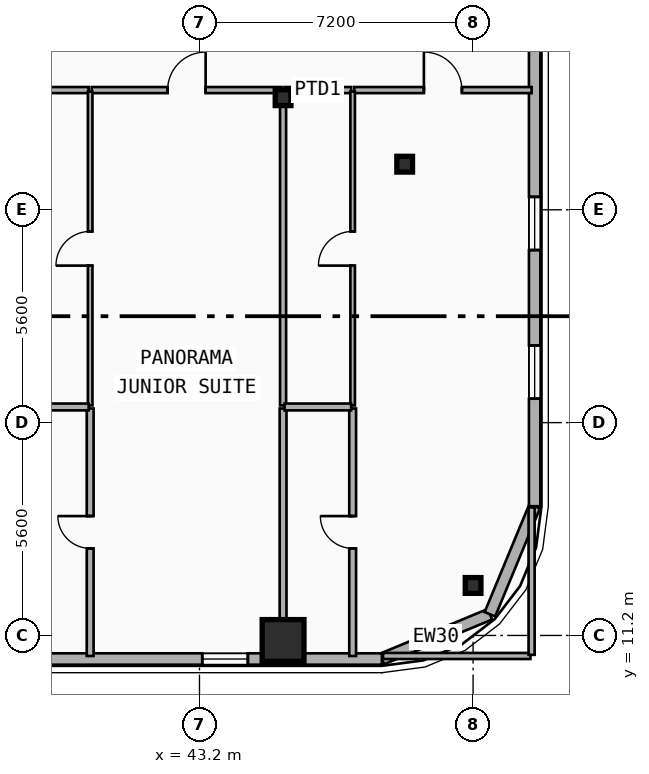
"""IFC4 building model, lengths in metres.
Left out: names, types, materials, properties, quantities, classifications, styles, units other than length and angle.
Written with IfcOpenShell. Run it as: python <this file> out.ifc"""

import sys

from ifc_helpers import new_model, si_unit, direction, frame, frame_2d, origin, origin_2d, place, context, subcontext, project, spatial, rectangle, i_section, extrude, element, fill, save


model = new_model("IFC4")
c1 = context("Model", 3, precision=1e-05, world=origin(), true_north=direction((0.0, 1.0)))
c2 = subcontext(c1, "Body", "Model", "MODEL_VIEW")
j1 = project(units=[si_unit("LENGTHUNIT", "METRE"), si_unit("PLANEANGLEUNIT", "RADIAN")], contexts=[c1])
p1 = place(None, origin())
s1 = spatial("IfcSite", under=j1, at=p1, CompositionType="ELEMENT")
p2 = place(p1, origin())
s2 = spatial("IfcBuilding", under=s1, at=p2, CompositionType="ELEMENT")
p3 = place(p2, frame((0.0, 0.0, 166.1)))
s3 = spatial("IfcBuildingStorey", under=s2, at=p3, CompositionType="ELEMENT", Elevation=166.1)
p4 = place(p3, frame((45.4, 25.35, 0.0), z_axis=(0.0, 0.0, 1.0), x_axis=(1.0, 0.0, 0.0)))
e1 = element("IfcColumn", 1, at=p4, inside=s3, PredefinedType="COLUMN", context=c2, shape_type="SweptSolid", body=[
    extrude(i_section(OverallWidth=0.413, OverallDepth=0.415, WebThickness=0.03, FlangeThickness=0.047, FilletRadius=0.015, at=origin_2d()), origin(), (0.0, 0.0, 1.0), 3.55),
])
p5 = place(p3, frame((45.4, 11.176, 0.0), z_axis=(0.0, -0.090276360409, 0.995916752922), x_axis=(1.0, 0.0, 0.0)))
e2 = element("IfcColumn", 2, at=p5, inside=s3, PredefinedType="COLUMN", context=c2, shape_type="SweptSolid", body=[
    extrude(rectangle(XDim=1.1, YDim=1.1, at=origin_2d()), origin(), (0.0, 0.0, 1.0), 3.564),
])
p6 = place(p3, frame((48.6, 23.6, 0.0), z_axis=(0.0, 0.0, 1.0), x_axis=(1.0, 0.0, 0.0)))
e3 = element("IfcColumn", 3, at=p6, inside=s3, PredefinedType="COLUMN", context=c2, shape_type="SweptSolid", body=[
    extrude(i_section(OverallWidth=0.413, OverallDepth=0.415, WebThickness=0.03, FlangeThickness=0.047, FilletRadius=0.015, at=origin_2d()), origin(), (0.0, 0.0, 1.0), 3.55),
])
p7 = place(p3, frame((50.4, 12.612, 0.0), z_axis=(0.0, -0.079935956101, 0.996800001466), x_axis=(1.0, 0.0, 0.0)))
e4 = element("IfcColumn", 4, at=p7, inside=s3, PredefinedType="COLUMN", context=c2, shape_type="SweptSolid", body=[
    extrude(i_section(OverallWidth=0.413, OverallDepth=0.415, WebThickness=0.03, FlangeThickness=0.047, FilletRadius=0.015, at=origin_2d()), origin(), (0.0, 0.0, 1.0), 3.561),
])
p8 = place(p3, frame((50.843, 11.757, 0.0), z_axis=(0.0, 0.0, 1.0), x_axis=(-0.92389884758, -0.382636798336, 0.0)))
e5 = element("IfcWall", 5, at=p8, inside=s3, PredefinedType="SOLIDWALL", context=c2, shape_type="SweptSolid", body=[
    extrude(rectangle(XDim=3.077, YDim=0.3, at=frame_2d((1.538, 0.0))), origin(), (0.0, 0.0, 1.0), 3.29),
])
p9 = place(p3, frame((52.02, 14.6, 0.0), z_axis=(0.0, 0.0, 1.0), x_axis=(-0.382676475685, -0.923882414032, 0.0)))
e6 = element("IfcWall", 6, at=p9, inside=s3, PredefinedType="SOLIDWALL", context=c2, shape_type="SweptSolid", body=[
    extrude(rectangle(XDim=3.077, YDim=0.3, at=frame_2d((1.539, 0.0))), origin(), (0.0, 0.0, 1.0), 3.29),
])
p10 = place(p3, frame((52.02, 37.6, 0.0), z_axis=(0.0, 0.0, 1.0), x_axis=(0.0, -1.0, 0.0)))
e7 = element("IfcWall", 7, at=p10, inside=s3, PredefinedType="SOLIDWALL", context=c2, shape_type="SweptSolid", body=[
    extrude(rectangle(XDim=23.0, YDim=0.3, at=frame_2d((11.5, 0.0))), origin(), (0.0, 0.0, 1.0), 3.29),
])
p11 = place(p10, frame((2.513, 0.0, 0.34)))
e8 = element("IfcOpeningElement", 8, at=p11, cuts=e7, PredefinedType="OPENING", context=c2, shape_type="SweptSolid", body=[
    extrude(rectangle(XDim=1.4, YDim=2.1, at=frame_2d((0.7, 1.05))), frame((0.0, 0.16, 0.0), z_axis=(0.0, -1.0, 0.0), x_axis=(1.0, 0.0, 0.0)), (0.0, 0.0, 1.0), 0.32),
])
p12 = place(p10, frame((6.107, 0.0, 0.34)))
e9 = element("IfcOpeningElement", 9, at=p12, cuts=e7, PredefinedType="OPENING", context=c2, shape_type="SweptSolid", body=[
    extrude(rectangle(XDim=1.4, YDim=2.1, at=frame_2d((0.7, 1.05))), frame((0.0, 0.16, 0.0), z_axis=(0.0, -1.0, 0.0), x_axis=(1.0, 0.0, 0.0)), (0.0, 0.0, 1.0), 0.32),
])
p13 = place(p10, frame((14.86, 0.0, 0.34)))
e10 = element("IfcOpeningElement", 10, at=p13, cuts=e7, PredefinedType="OPENING", context=c2, shape_type="SweptSolid", body=[
    extrude(rectangle(XDim=1.4, YDim=2.1, at=frame_2d((0.7, 1.05))), frame((0.0, 0.16, 0.0), z_axis=(0.0, -1.0, 0.0), x_axis=(1.0, 0.0, 0.0)), (0.0, 0.0, 1.0), 0.32),
])
p14 = place(p10, frame((18.77, 0.0, 0.34)))
e11 = element("IfcOpeningElement", 11, at=p14, cuts=e7, PredefinedType="OPENING", context=c2, shape_type="SweptSolid", body=[
    extrude(rectangle(XDim=1.4, YDim=2.1, at=frame_2d((0.7, 1.05))), frame((0.0, 0.16, 0.0), z_axis=(0.0, -1.0, 0.0), x_axis=(1.0, 0.0, 0.0)), (0.0, 0.0, 1.0), 0.32),
])
p15 = place(p3, frame((48.0, 10.58, 0.0), z_axis=(0.0, 0.0, 1.0), x_axis=(-1.0, 0.0, 0.0)))
e12 = element("IfcWall", 12, at=p15, inside=s3, PredefinedType="SOLIDWALL", context=c2, shape_type="SweptSolid", body=[
    extrude(rectangle(XDim=38.4, YDim=0.3, at=frame_2d((19.2, 0.0))), origin(), (0.0, 0.0, 1.0), 2.91),
])
p16 = place(p15, frame((33.673, 0.0, 0.65)))
e13 = element("IfcOpeningElement", 13, at=p16, cuts=e12, PredefinedType="OPENING", context=c2, shape_type="SweptSolid", body=[
    extrude(rectangle(XDim=1.2, YDim=1.5, at=frame_2d((0.6, 0.75))), frame((0.0, 0.16, 0.0), z_axis=(0.0, -1.0, 0.0), x_axis=(1.0, 0.0, 0.0)), (0.0, 0.0, 1.0), 0.32),
])
p17 = place(p15, frame((21.463, 0.0, 0.63)))
e14 = element("IfcOpeningElement", 14, at=p17, cuts=e12, PredefinedType="OPENING", context=c2, shape_type="SweptSolid", body=[
    extrude(rectangle(XDim=2.1, YDim=2.1, at=frame_2d((1.05, 1.05))), frame((0.0, 0.16, 0.0), z_axis=(0.0, -1.0, 0.0), x_axis=(1.0, 0.0, 0.0)), (0.0, 0.0, 1.0), 0.32),
])
p18 = place(p15, frame((14.375, 0.0, 0.63)))
e15 = element("IfcOpeningElement", 15, at=p18, cuts=e12, PredefinedType="OPENING", context=c2, shape_type="SweptSolid", body=[
    extrude(rectangle(XDim=2.1, YDim=2.1, at=frame_2d((1.05, 1.05))), frame((0.0, 0.16, 0.0), z_axis=(0.0, -1.0, 0.0), x_axis=(1.0, 0.0, 0.0)), (0.0, 0.0, 1.0), 0.32),
])
p19 = place(p15, frame((3.527, 0.0, 1.22)))
e16 = element("IfcOpeningElement", 16, at=p19, cuts=e12, PredefinedType="OPENING", context=c2, shape_type="SweptSolid", body=[
    extrude(rectangle(XDim=1.2, YDim=1.5, at=frame_2d((0.6, 0.75))), frame((0.0, 0.16, 0.0), z_axis=(0.0, -1.0, 0.0), x_axis=(1.0, 0.0, 0.0)), (0.0, 0.0, 1.0), 0.32),
])
p20 = place(p15, frame((27.42, 0.0, 0.75)))
e17 = element("IfcOpeningElement", 17, at=p20, cuts=e12, PredefinedType="OPENING", context=c2, shape_type="SweptSolid", body=[
    extrude(rectangle(XDim=1.2, YDim=1.5, at=frame_2d((0.6, 0.75))), frame((0.0, 0.16, 0.0), z_axis=(0.0, -1.0, 0.0), x_axis=(1.0, 0.0, 0.0)), (0.0, 0.0, 1.0), 0.32),
])
p21 = place(p3, frame((40.364, 25.55, 0.0), z_axis=(0.0, 0.0, 1.0), x_axis=(1.0, 0.0, 0.0)))
e18 = element("IfcWall", 18, at=p21, inside=s3, PredefinedType="PARTITIONING", context=c2, shape_type="SweptSolid", body=[
    extrude(rectangle(XDim=4.996, YDim=0.16, at=frame_2d((2.498, 0.0))), origin(), (0.0, 0.0, 1.0), 2.36),
])
p22 = place(p21, frame((1.998, 0.0, 0.0)))
e19 = element("IfcOpeningElement", 19, at=p22, cuts=e18, PredefinedType="OPENING", context=c2, shape_type="SweptSolid", body=[
    extrude(rectangle(XDim=1.0, YDim=2.15, at=frame_2d((0.5, 1.075))), frame((0.0, 0.09, 0.0), z_axis=(0.0, -1.0, 0.0), x_axis=(1.0, 0.0, 0.0)), (0.0, 0.0, 1.0), 0.18),
])
p23 = place(p3, frame((38.39, 25.55, 0.0), z_axis=(0.0, 0.0, 1.0), x_axis=(1.0, 0.0, 0.0)))
e20 = element("IfcWall", 20, at=p23, inside=s3, PredefinedType="PARTITIONING", context=c2, shape_type="SweptSolid", body=[
    extrude(rectangle(XDim=1.894, YDim=0.16, at=frame_2d((0.947, 0.0))), origin(), (0.0, 0.0, 1.0), 3.29),
])
p24 = place(p3, frame((47.271, 25.55, 0.0), z_axis=(0.0, 0.0, 1.0), x_axis=(1.0, 0.0, 0.0)))
e21 = element("IfcWall", 21, at=p24, inside=s3, PredefinedType="PARTITIONING", context=c2, shape_type="SweptSolid", body=[
    extrude(rectangle(XDim=4.669, YDim=0.16, at=frame_2d((2.334, 0.0))), origin(), (0.0, 0.0, 1.0), 2.62),
])
p25 = place(p24, frame((1.834, 0.0, 0.0)))
e22 = element("IfcOpeningElement", 22, at=p25, cuts=e21, PredefinedType="OPENING", context=c2, shape_type="SweptSolid", body=[
    extrude(rectangle(XDim=1.0, YDim=2.15, at=frame_2d((0.5, 1.075))), frame((0.0, 0.09, 0.0), z_axis=(0.0, -1.0, 0.0), x_axis=(1.0, 0.0, 0.0)), (0.0, 0.0, 1.0), 0.18),
])
p26 = place(p3, frame((45.44, 25.55, 0.0), z_axis=(0.0, 0.0, 1.0), x_axis=(1.0, 0.0, 0.0)))
e23 = element("IfcWall", 23, at=p26, inside=s3, PredefinedType="PARTITIONING", context=c2, shape_type="SweptSolid", body=[
    extrude(rectangle(XDim=1.751, YDim=0.16, at=frame_2d((0.875, 0.0))), origin(), (0.0, 0.0, 1.0), 2.36),
])
p27 = place(p3, frame((40.324, 10.66, 0.0), z_axis=(0.0, 0.0, 1.0), x_axis=(0.0, 1.0, 0.0)))
e24 = element("IfcWall", 24, at=p27, inside=s3, PredefinedType="PLUMBINGWALL", context=c2, shape_type="SweptSolid", body=[
    extrude(rectangle(XDim=6.512, YDim=0.18, at=frame_2d((3.256, 0.0))), origin(), (0.0, 0.0, 1.0), 2.78),
])
p28 = place(p27, frame((2.831, 0.0, 0.0)))
e25 = element("IfcOpeningElement", 25, at=p28, cuts=e24, PredefinedType="OPENING", context=c2, shape_type="SweptSolid", body=[
    extrude(rectangle(XDim=0.85, YDim=2.1, at=frame_2d((0.425, 1.05))), frame((0.0, 0.1, 0.0), z_axis=(0.0, -1.0, 0.0), x_axis=(1.0, 0.0, 0.0)), (0.0, 0.0, 1.0), 0.2),
])
p29 = place(p3, frame((40.324, 17.252, 0.0), z_axis=(0.0, 0.0, 1.0), x_axis=(0.0, 1.0, 0.0)))
e26 = element("IfcWall", 26, at=p29, inside=s3, PredefinedType="PARTITIONING", context=c2, shape_type="SweptSolid", body=[
    extrude(rectangle(XDim=8.258, YDim=0.12, at=frame_2d((4.129, 0.0))), origin(), (0.0, 0.0, 1.0), 2.78),
])
p30 = place(p29, frame((3.679, 0.0, 0.0)))
e27 = element("IfcOpeningElement", 27, at=p30, cuts=e26, PredefinedType="OPENING", context=c2, shape_type="SweptSolid", body=[
    extrude(rectangle(XDim=0.9, YDim=2.1, at=frame_2d((0.45, 1.05))), frame((0.0, 0.07, 0.0), z_axis=(0.0, -1.0, 0.0), x_axis=(1.0, 0.0, 0.0)), (0.0, 0.0, 1.0), 0.14),
])
p31 = place(p3, frame((45.4, 10.66, 0.0), z_axis=(0.0, 0.0, 1.0), x_axis=(0.0, 1.0, 0.0)))
e28 = element("IfcWall", 28, at=p31, inside=s3, PredefinedType="PLUMBINGWALL", context=c2, shape_type="SweptSolid", body=[
    extrude(rectangle(XDim=6.512, YDim=0.18, at=frame_2d((3.256, 0.0))), origin(), (0.0, 0.0, 1.0), 2.36),
])
p32 = place(p3, frame((45.4, 17.252, 0.0), z_axis=(0.0, 0.0, 1.0), x_axis=(0.0, 1.0, 0.0)))
e29 = element("IfcWall", 29, at=p32, inside=s3, PredefinedType="PARTITIONING", context=c2, shape_type="SweptSolid", body=[
    extrude(rectangle(XDim=8.258, YDim=0.16, at=frame_2d((4.129, 0.0))), origin(), (0.0, 0.0, 1.0), 2.36),
])
p33 = place(p3, frame((38.39, 17.212, 0.0), z_axis=(0.0, 0.0, 1.0), x_axis=(1.0, 0.0, 0.0)))
e30 = element("IfcWall", 30, at=p33, inside=s3, PredefinedType="PLUMBINGWALL", context=c2, shape_type="SweptSolid", body=[
    extrude(rectangle(XDim=1.894, YDim=0.18, at=frame_2d((0.947, 0.0))), origin(), (0.0, 0.0, 1.0), 3.29),
])
p34 = place(p3, frame((47.231, 10.66, 0.0), z_axis=(0.0, 0.0, 1.0), x_axis=(0.0, 1.0, 0.0)))
e31 = element("IfcWall", 31, at=p34, inside=s3, PredefinedType="PLUMBINGWALL", context=c2, shape_type="SweptSolid", body=[
    extrude(rectangle(XDim=6.512, YDim=0.18, at=frame_2d((3.256, 0.0))), origin(), (0.0, 0.0, 1.0), 2.97),
])
p35 = place(p34, frame((2.831, 0.0, 0.0)))
e32 = element("IfcOpeningElement", 32, at=p35, cuts=e31, PredefinedType="OPENING", context=c2, shape_type="SweptSolid", body=[
    extrude(rectangle(XDim=0.85, YDim=2.1, at=frame_2d((0.425, 1.05))), frame((0.0, 0.1, 0.0), z_axis=(0.0, -1.0, 0.0), x_axis=(1.0, 0.0, 0.0)), (0.0, 0.0, 1.0), 0.2),
])
p36 = place(p3, frame((47.231, 17.252, 0.0), z_axis=(0.0, 0.0, 1.0), x_axis=(0.0, 1.0, 0.0)))
e33 = element("IfcWall", 33, at=p36, inside=s3, PredefinedType="PARTITIONING", context=c2, shape_type="SweptSolid", body=[
    extrude(rectangle(XDim=8.258, YDim=0.12, at=frame_2d((4.129, 0.0))), origin(), (0.0, 0.0, 1.0), 2.77),
])
p37 = place(p36, frame((3.679, 0.0, 0.0)))
e34 = element("IfcOpeningElement", 34, at=p37, cuts=e33, PredefinedType="OPENING", context=c2, shape_type="SweptSolid", body=[
    extrude(rectangle(XDim=0.9, YDim=2.1, at=frame_2d((0.45, 1.05))), frame((0.0, 0.07, 0.0), z_axis=(0.0, -1.0, 0.0), x_axis=(1.0, 0.0, 0.0)), (0.0, 0.0, 1.0), 0.14),
])
p38 = place(p3, frame((45.44, 17.212, 0.0), z_axis=(0.0, 0.0, 1.0), x_axis=(1.0, 0.0, 0.0)))
e35 = element("IfcWall", 35, at=p38, inside=s3, PredefinedType="PLUMBINGWALL", context=c2, shape_type="SweptSolid", body=[
    extrude(rectangle(XDim=1.751, YDim=0.18, at=frame_2d((0.875, 0.0))), origin(), (0.0, 0.0, 1.0), 2.36),
])
p39 = place(p3, frame((48.03, 10.66, 0.0), z_axis=(0.0, 0.0, 1.0), x_axis=(1.0, 0.0, 0.0)))
e36 = element("IfcWall", 36, at=p39, inside=s3, PredefinedType="PARTITIONING", context=c2, shape_type="SweptSolid", body=[
    extrude(rectangle(XDim=3.88, YDim=0.16, at=frame_2d((1.94, 0.0))), origin(), (0.0, 0.0, 1.0), 3.29),
])
p40 = place(p3, frame((51.94, 10.69, 0.0), z_axis=(0.0, 0.0, 1.0), x_axis=(0.0, 1.0, 0.0)))
e37 = element("IfcWall", 37, at=p40, inside=s3, PredefinedType="PARTITIONING", context=c2, shape_type="SweptSolid", body=[
    extrude(rectangle(XDim=3.88, YDim=0.16, at=frame_2d((1.94, 0.0))), origin(), (0.0, 0.0, 1.0), 3.29),
])
p41 = place(p13, origin())
e38 = element("IfcWindow", 38, at=p41, inside=s3, PartitioningType="SINGLE_PANEL", PredefinedType="WINDOW", context=c2, shape_type="SweptSolid", body=[
    extrude(rectangle(XDim=1.4, YDim=2.1, at=frame_2d((0.7, 1.05))), frame((0.0, 0.03, 0.0), z_axis=(0.0, -1.0, 0.0), x_axis=(1.0, 0.0, 0.0)), (0.0, 0.0, 1.0), 0.06),
])
fill(e10, e38)
p42 = place(p14, origin())
e39 = element("IfcWindow", 39, at=p42, inside=s3, PartitioningType="SINGLE_PANEL", PredefinedType="WINDOW", context=c2, shape_type="SweptSolid", body=[
    extrude(rectangle(XDim=1.4, YDim=2.1, at=frame_2d((0.7, 1.05))), frame((0.0, 0.03, 0.0), z_axis=(0.0, -1.0, 0.0), x_axis=(1.0, 0.0, 0.0)), (0.0, 0.0, 1.0), 0.06),
])
fill(e11, e39)
p43 = place(p19, origin())
e40 = element("IfcWindow", 40, at=p43, inside=s3, PartitioningType="SINGLE_PANEL", PredefinedType="WINDOW", context=c2, shape_type="SweptSolid", body=[
    extrude(rectangle(XDim=1.2, YDim=1.5, at=frame_2d((0.6, 0.75))), frame((0.0, 0.03, 0.0), z_axis=(0.0, -1.0, 0.0), x_axis=(1.0, 0.0, 0.0)), (0.0, 0.0, 1.0), 0.06),
])
fill(e16, e40)
p44 = place(p22, origin())
e41 = element("IfcDoor", 41, at=p44, inside=s3, OperationType="SINGLE_SWING_RIGHT", PredefinedType="DOOR", context=c2, shape_type="SweptSolid", body=[
    extrude(rectangle(XDim=1.0, YDim=2.15, at=frame_2d((0.5, 1.075))), frame((0.0, 0.025, 0.0), z_axis=(0.0, -1.0, 0.0), x_axis=(1.0, 0.0, 0.0)), (0.0, 0.0, 1.0), 0.05),
])
fill(e19, e41)
p45 = place(p25, origin())
e42 = element("IfcDoor", 42, at=p45, inside=s3, OperationType="SINGLE_SWING_LEFT", PredefinedType="DOOR", context=c2, shape_type="SweptSolid", body=[
    extrude(rectangle(XDim=1.0, YDim=2.15, at=frame_2d((0.5, 1.075))), frame((0.0, 0.025, 0.0), z_axis=(0.0, -1.0, 0.0), x_axis=(1.0, 0.0, 0.0)), (0.0, 0.0, 1.0), 0.05),
])
fill(e22, e42)
p46 = place(p28, origin())
e43 = element("IfcDoor", 43, at=p46, inside=s3, OperationType="SINGLE_SWING_RIGHT", PredefinedType="DOOR", context=c2, shape_type="SweptSolid", body=[
    extrude(rectangle(XDim=0.85, YDim=2.1, at=frame_2d((0.425, 1.05))), frame((0.0, 0.025, 0.0), z_axis=(0.0, -1.0, 0.0), x_axis=(1.0, 0.0, 0.0)), (0.0, 0.0, 1.0), 0.05),
])
fill(e25, e43)
p47 = place(p30, origin())
e44 = element("IfcDoor", 44, at=p47, inside=s3, OperationType="SINGLE_SWING_LEFT", PredefinedType="DOOR", context=c2, shape_type="SweptSolid", body=[
    extrude(rectangle(XDim=0.9, YDim=2.1, at=frame_2d((0.45, 1.05))), frame((0.0, 0.025, 0.0), z_axis=(0.0, -1.0, 0.0), x_axis=(1.0, 0.0, 0.0)), (0.0, 0.0, 1.0), 0.05),
])
fill(e27, e44)
p48 = place(p35, origin())
e45 = element("IfcDoor", 45, at=p48, inside=s3, OperationType="SINGLE_SWING_RIGHT", PredefinedType="DOOR", context=c2, shape_type="SweptSolid", body=[
    extrude(rectangle(XDim=0.85, YDim=2.1, at=frame_2d((0.425, 1.05))), frame((0.0, 0.025, 0.0), z_axis=(0.0, -1.0, 0.0), x_axis=(1.0, 0.0, 0.0)), (0.0, 0.0, 1.0), 0.05),
])
fill(e32, e45)
p49 = place(p37, origin())
e46 = element("IfcDoor", 46, at=p49, inside=s3, OperationType="SINGLE_SWING_LEFT", PredefinedType="DOOR", context=c2, shape_type="SweptSolid", body=[
    extrude(rectangle(XDim=0.9, YDim=2.1, at=frame_2d((0.45, 1.05))), frame((0.0, 0.025, 0.0), z_axis=(0.0, -1.0, 0.0), x_axis=(1.0, 0.0, 0.0)), (0.0, 0.0, 1.0), 0.05),
])
fill(e34, e46)
save(model, sys.argv[1])
